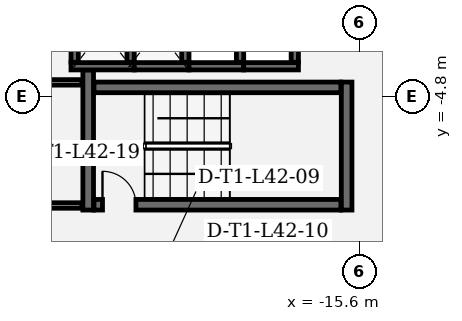
"""IFC4 building model, lengths in metres.
Left out: names, types, materials, properties, quantities, classifications, styles, units other than length and angle.
Written with IfcOpenShell. Run it as: python <this file> out.ifc"""

import sys

from ifc_helpers import new_model, si_unit, direction, frame, frame_2d, origin, place, context, subcontext, project, spatial, rectangle, extrude, element, fill, save


model = new_model("IFC4")
c1 = context("Model", 3, precision=1e-05, world=origin(), true_north=direction((0.0, 1.0)))
c2 = subcontext(c1, "Body", "Model", "MODEL_VIEW")
j1 = project(units=[si_unit("LENGTHUNIT", "METRE"), si_unit("PLANEANGLEUNIT", "RADIAN")], contexts=[c1])
p1 = place(None, origin())
s1 = spatial("IfcSite", under=j1, at=p1, CompositionType="ELEMENT")
p2 = place(p1, origin())
s2 = spatial("IfcBuilding", under=s1, at=p2, CompositionType="ELEMENT")
p3 = place(p2, frame((0.0, 0.0, 184.8)))
s3 = spatial("IfcBuildingStorey", under=s2, at=p3, CompositionType="ELEMENT", Elevation=184.8)
p4 = place(p3, frame((-24.525, -3.94, 0.0), z_axis=(0.0, 0.0, 1.0), x_axis=(0.0, -1.0, 0.0)))
e1 = element("IfcWall", 1, at=p4, inside=s3, PredefinedType="SHEAR", context=c2, shape_type="SweptSolid", body=[
    extrude(rectangle(XDim=4.61, YDim=0.35, at=frame_2d((2.305, 0.0))), origin(), (0.0, 0.0, 1.0), 3.78),
])
p5 = place(p3, frame((-16.025, -8.55, 0.0), z_axis=(0.0, 0.0, 1.0), x_axis=(0.0, 1.0, 0.0)))
e2 = element("IfcWall", 2, at=p5, inside=s3, PredefinedType="SHEAR", context=c2, shape_type="SweptSolid", body=[
    extrude(rectangle(XDim=4.21, YDim=0.35, at=frame_2d((2.105, 0.0))), origin(), (0.0, 0.0, 1.0), 3.78),
])
p6 = place(p3, frame((-24.335, -8.375, 0.0), z_axis=(0.0, 0.0, 1.0), x_axis=(1.0, 0.0, 0.0)))
e3 = element("IfcWall", 3, at=p6, inside=s3, PredefinedType="SHEAR", context=c2, shape_type="SweptSolid", body=[
    extrude(rectangle(XDim=8.12, YDim=0.35, at=frame_2d((4.06, 0.0))), origin(), (0.0, 0.0, 1.0), 3.78),
])
p7 = place(p6, frame((0.28, 0.0, 0.0)))
e4 = element("IfcOpeningElement", 4, at=p7, cuts=e3, PredefinedType="OPENING", context=c2, shape_type="SweptSolid", body=[
    extrude(rectangle(XDim=1.1, YDim=2.2, at=frame_2d((0.55, 1.1))), frame((0.0, 0.185, 0.0), z_axis=(0.0, -1.0, 0.0), x_axis=(1.0, 0.0, 0.0)), (0.0, 0.0, 1.0), 0.37),
])
p8 = place(p3, frame((-16.215, -4.515, 0.0), z_axis=(0.0, 0.0, 1.0), x_axis=(-1.0, 0.0, 0.0)))
e5 = element("IfcWall", 5, at=p8, inside=s3, PredefinedType="SHEAR", context=c2, shape_type="SweptSolid", body=[
    extrude(rectangle(XDim=8.12, YDim=0.35, at=frame_2d((4.06, 0.0))), origin(), (0.0, 0.0, 1.0), 3.78),
])
p9 = place(p3, frame((-23.01, -3.82, 0.0), z_axis=(0.0, 0.0, 1.0), x_axis=(-1.0, 0.0, 0.0)))
e6 = element("IfcWall", 6, at=p9, inside=s3, PredefinedType="SHEAR", context=c2, shape_type="SweptSolid", body=[
    extrude(rectangle(XDim=2.08, YDim=0.24, at=frame_2d((1.04, 0.0))), origin(), (0.0, 0.0, 1.0), 3.78),
])
for number, where, z_axis, x_axis in (
    (7, (-24.97, -3.688, 0.0), (0.0, 0.0, 1.0), (0.0, 1.0, 0.0)),
    (8, (-23.13, -1.562, 0.0), (0.0, 0.0, 1.0), (0.0, -1.0, 0.0)),
):
    element("IfcWall", number, at=place(p3, frame(where, z_axis=z_axis, x_axis=x_axis)), inside=s3, PredefinedType="SHEAR", context=c2, shape_type="SweptSolid", body=[
        extrude(rectangle(XDim=2.126, YDim=0.24, at=frame_2d((1.063, 0.0))), origin(), (0.0, 0.0, 1.0), 3.78),
    ])
p10 = place(p3, frame((-21.21, -3.82, 0.0), z_axis=(0.0, 0.0, 1.0), x_axis=(-1.0, 0.0, 0.0)))
e9 = element("IfcWall", 9, at=p10, inside=s3, PredefinedType="SHEAR", context=c2, shape_type="SweptSolid", body=[
    extrude(rectangle(XDim=1.8, YDim=0.24, at=frame_2d((0.9, 0.0))), origin(), (0.0, 0.0, 1.0), 3.78),
])
p11 = place(p3, frame((-21.33, -1.562, 0.0), z_axis=(0.0, 0.0, 1.0), x_axis=(0.0, -1.0, 0.0)))
e10 = element("IfcWall", 10, at=p11, inside=s3, PredefinedType="SHEAR", context=c2, shape_type="SweptSolid", body=[
    extrude(rectangle(XDim=2.126, YDim=0.24, at=frame_2d((1.063, 0.0))), origin(), (0.0, 0.0, 1.0), 3.78),
])
p12 = place(p3, frame((-19.41, -3.82, 0.0), z_axis=(0.0, 0.0, 1.0), x_axis=(-1.0, 0.0, 0.0)))
e11 = element("IfcWall", 11, at=p12, inside=s3, PredefinedType="SHEAR", context=c2, shape_type="SweptSolid", body=[
    extrude(rectangle(XDim=1.8, YDim=0.24, at=frame_2d((0.9, 0.0))), origin(), (0.0, 0.0, 1.0), 3.78),
])
p13 = place(p3, frame((-19.53, -1.562, 0.0), z_axis=(0.0, 0.0, 1.0), x_axis=(0.0, -1.0, 0.0)))
e12 = element("IfcWall", 12, at=p13, inside=s3, PredefinedType="SHEAR", context=c2, shape_type="SweptSolid", body=[
    extrude(rectangle(XDim=2.126, YDim=0.24, at=frame_2d((1.063, 0.0))), origin(), (0.0, 0.0, 1.0), 3.78),
])
p14 = place(p3, frame((-17.61, -3.82, 0.0), z_axis=(0.0, 0.0, 1.0), x_axis=(-1.0, 0.0, 0.0)))
e13 = element("IfcWall", 13, at=p14, inside=s3, PredefinedType="SHEAR", context=c2, shape_type="SweptSolid", body=[
    extrude(rectangle(XDim=1.8, YDim=0.24, at=frame_2d((0.9, 0.0))), origin(), (0.0, 0.0, 1.0), 3.78),
])
p15 = place(p3, frame((-17.73, -1.562, 0.0), z_axis=(0.0, 0.0, 1.0), x_axis=(0.0, -1.0, 0.0)))
e14 = element("IfcWall", 14, at=p15, inside=s3, PredefinedType="SHEAR", context=c2, shape_type="SweptSolid", body=[
    extrude(rectangle(XDim=2.126, YDim=0.24, at=frame_2d((1.063, 0.0))), origin(), (0.0, 0.0, 1.0), 3.78),
])
p16 = place(p3, frame((-28.355, -8.4, 0.0), z_axis=(0.0, 0.0, 1.0), x_axis=(1.0, 0.0, 0.0)))
e15 = element("IfcWall", 15, at=p16, inside=s3, PredefinedType="PARTITIONING", context=c2, shape_type="SweptSolid", body=[
    extrude(rectangle(XDim=3.622, YDim=0.18, at=frame_2d((1.811, 0.0))), origin(), (0.0, 0.0, 1.0), 3.78),
])
p17 = place(p16, frame((1.311, 0.0, 0.0)))
e16 = element("IfcOpeningElement", 16, at=p17, cuts=e15, PredefinedType="OPENING", context=c2, shape_type="SweptSolid", body=[
    extrude(rectangle(XDim=1.0, YDim=2.15, at=frame_2d((0.5, 1.075))), frame((0.0, 0.1, 0.0), z_axis=(0.0, -1.0, 0.0), x_axis=(1.0, 0.0, 0.0)), (0.0, 0.0, 1.0), 0.2),
])
p18 = place(p3, frame((-24.733, -4.35, 0.0), z_axis=(0.0, 0.0, 1.0), x_axis=(-1.0, 0.0, 0.0)))
e17 = element("IfcWall", 17, at=p18, inside=s3, PredefinedType="PARTITIONING", context=c2, shape_type="SweptSolid", body=[
    extrude(rectangle(XDim=3.622, YDim=0.18, at=frame_2d((1.811, 0.0))), origin(), (0.0, 0.0, 1.0), 3.78),
])
p19 = place(p7, origin())
e18 = element("IfcDoor", 18, at=p19, inside=s3, OperationType="SINGLE_SWING_LEFT", PredefinedType="DOOR", context=c2, shape_type="SweptSolid", body=[
    extrude(rectangle(XDim=1.1, YDim=2.2, at=frame_2d((0.55, 1.1))), frame((0.0, 0.025, 0.0), z_axis=(0.0, -1.0, 0.0), x_axis=(1.0, 0.0, 0.0)), (0.0, 0.0, 1.0), 0.05),
])
fill(e4, e18)
save(model, sys.argv[1])
